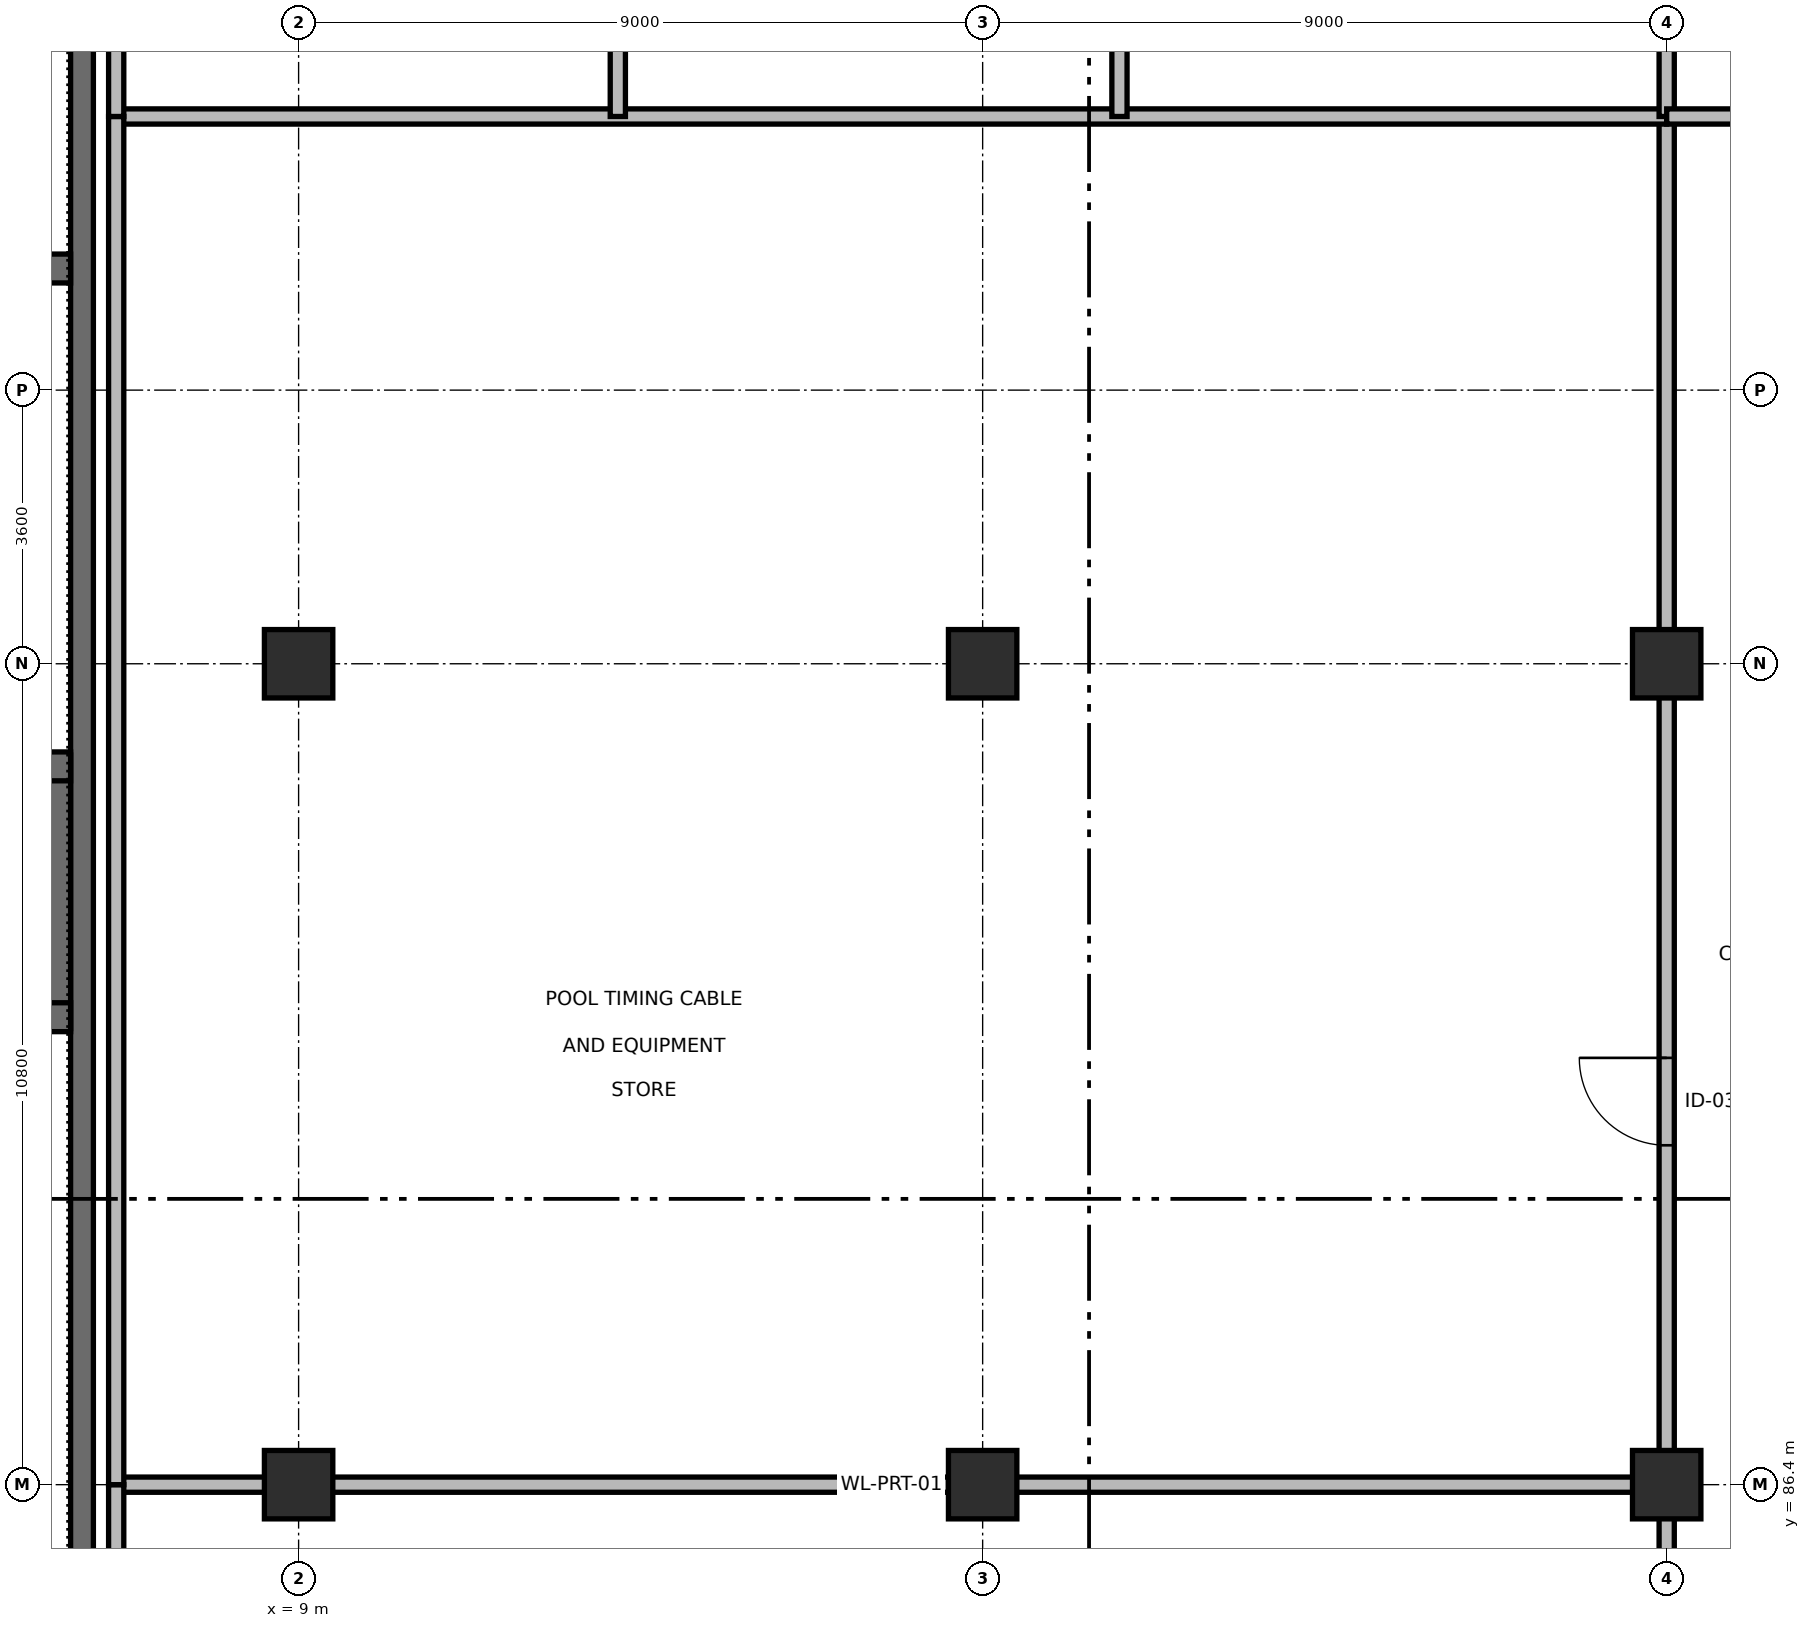
"""IFC4 building model, lengths in metres.
Left out: names, types, materials, properties, quantities, classifications, styles, units other than length and angle.
Written with IfcOpenShell. Run it as: python <this file> out.ifc"""

import sys

from ifc_helpers import new_model, si_unit, direction, frame, frame_2d, origin, origin_2d, place, context, subcontext, project, spatial, rectangle, extrude, element, fill, save


model = new_model("IFC4")
c1 = context("Model", 3, precision=1e-05, world=origin(), true_north=direction((0.0, 1.0)))
c2 = subcontext(c1, "Body", "Model", "MODEL_VIEW")
j1 = project(units=[si_unit("LENGTHUNIT", "METRE"), si_unit("PLANEANGLEUNIT", "RADIAN")], contexts=[c1])
p1 = place(None, origin())
s1 = spatial("IfcSite", under=j1, at=p1, CompositionType="ELEMENT")
p2 = place(p1, origin())
s2 = spatial("IfcBuilding", under=s1, at=p2, CompositionType="ELEMENT")
p3 = place(p2, frame((0.0, 0.0, -4.8)))
s3 = spatial("IfcBuildingStorey", under=s2, at=p3, CompositionType="ELEMENT", Elevation=-4.8)
for number, where, z_axis, x_axis in (
    (1, (9.0, 86.4, 0.0), (0.0, 0.0, 1.0), (1.0, 0.0, 0.0)),
    (2, (9.0, 97.2, 0.0), (0.0, 0.0, 1.0), (1.0, 0.0, 0.0)),
    (3, (18.0, 86.4, 0.0), (0.0, 0.0, 1.0), (1.0, 0.0, 0.0)),
    (4, (18.0, 97.2, 0.0), (0.0, 0.0, 1.0), (1.0, 0.0, 0.0)),
    (5, (27.0, 86.4, 0.0), (0.0, 0.0, 1.0), (1.0, 0.0, 0.0)),
    (6, (27.0, 97.2, 0.0), (0.0, 0.0, 1.0), (1.0, 0.0, 0.0)),
):
    element("IfcColumn", number, at=place(p3, frame(where, z_axis=z_axis, x_axis=x_axis)), inside=s3, PredefinedType="COLUMN", context=c2, shape_type="SweptSolid", body=[
        extrude(rectangle(XDim=0.9, YDim=0.9, at=origin_2d()), origin(), (0.0, 0.0, 1.0), 4.8),
    ])
p4 = place(p3, frame((6.15, 73.2, 0.0), z_axis=(0.0, 0.0, 1.0), x_axis=(0.0, 1.0, 0.0)))
e7 = element("IfcWall", 7, at=p4, inside=s3, PredefinedType="USERDEFINED", context=c2, shape_type="SweptSolid", body=[
    extrude(rectangle(XDim=41.7, YDim=0.3, at=frame_2d((20.85, 0.0))), origin(), (0.0, 0.0, 1.0), 4.45),
])
p5 = place(p3, frame((27.0, 68.4, 0.0), z_axis=(0.0, 0.0, 1.0), x_axis=(0.0, 1.0, 0.0)))
e8 = element("IfcWall", 8, at=p5, inside=s3, PredefinedType="PARTITIONING", context=c2, shape_type="SweptSolid", body=[
    extrude(rectangle(XDim=18.0, YDim=0.2, at=frame_2d((9.0, 0.0))), origin(), (0.0, 0.0, 1.0), 3.885),
])
p6 = place(p5, frame((4.515, 0.0, 0.0)))
e9 = element("IfcOpeningElement", 9, at=p6, cuts=e8, PredefinedType="OPENING", context=c2, shape_type="SweptSolid", body=[
    extrude(rectangle(XDim=1.05, YDim=2.15, at=frame_2d((0.525, 1.075))), frame((0.0, 0.11, 0.0), z_axis=(0.0, -1.0, 0.0), x_axis=(1.0, 0.0, 0.0)), (0.0, 0.0, 1.0), 0.22),
])
p7 = place(p3, frame((6.6, 86.4, 0.0), z_axis=(0.0, 0.0, 1.0), x_axis=(1.0, 0.0, 0.0)))
e10 = element("IfcWall", 10, at=p7, inside=s3, PredefinedType="PARTITIONING", context=c2, shape_type="SweptSolid", body=[
    extrude(rectangle(XDim=20.4, YDim=0.2, at=frame_2d((10.2, 0.0))), origin(), (0.0, 0.0, 1.0), 3.835),
])
p8 = place(p3, frame((6.6, 68.4, 0.0), z_axis=(0.0, 0.0, 1.0), x_axis=(0.0, 1.0, 0.0)))
e11 = element("IfcWall", 11, at=p8, inside=s3, PredefinedType="PARTITIONING", context=c2, shape_type="SweptSolid", body=[
    extrude(rectangle(XDim=18.0, YDim=0.2, at=frame_2d((9.0, 0.0))), origin(), (0.0, 0.0, 1.0), 3.835),
])
p9 = place(p3, frame((27.0, 86.4, 0.0), z_axis=(0.0, 0.0, 1.0), x_axis=(0.0, 1.0, 0.0)))
e12 = element("IfcWall", 12, at=p9, inside=s3, PredefinedType="PARTITIONING", context=c2, shape_type="SweptSolid", body=[
    extrude(rectangle(XDim=18.0, YDim=0.2, at=frame_2d((9.0, 0.0))), origin(), (0.0, 0.0, 1.0), 3.735),
])
p10 = place(p9, frame((4.465, 0.0, 0.0)))
e13 = element("IfcOpeningElement", 13, at=p10, cuts=e12, PredefinedType="OPENING", context=c2, shape_type="SweptSolid", body=[
    extrude(rectangle(XDim=1.15, YDim=2.2, at=frame_2d((0.575, 1.1))), frame((0.0, 0.11, 0.0), z_axis=(0.0, -1.0, 0.0), x_axis=(1.0, 0.0, 0.0)), (0.0, 0.0, 1.0), 0.22),
])
p11 = place(p3, frame((6.6, 104.4, 0.0), z_axis=(0.0, 0.0, 1.0), x_axis=(1.0, 0.0, 0.0)))
e14 = element("IfcWall", 14, at=p11, inside=s3, PredefinedType="PARTITIONING", context=c2, shape_type="SweptSolid", body=[
    extrude(rectangle(XDim=20.4, YDim=0.2, at=frame_2d((10.2, 0.0))), origin(), (0.0, 0.0, 1.0), 3.735),
])
p12 = place(p3, frame((6.6, 86.4, 0.0), z_axis=(0.0, 0.0, 1.0), x_axis=(0.0, 1.0, 0.0)))
e15 = element("IfcWall", 15, at=p12, inside=s3, PredefinedType="PARTITIONING", context=c2, shape_type="SweptSolid", body=[
    extrude(rectangle(XDim=18.0, YDim=0.2, at=frame_2d((9.0, 0.0))), origin(), (0.0, 0.0, 1.0), 4.485),
])
p13 = place(p3, frame((13.2, 104.4, 0.0), z_axis=(0.0, 0.0, 1.0), x_axis=(0.0, 1.0, 0.0)))
e16 = element("IfcWall", 16, at=p13, inside=s3, PredefinedType="PARTITIONING", context=c2, shape_type="SweptSolid", body=[
    extrude(rectangle(XDim=10.8, YDim=0.2, at=frame_2d((5.4, 0.0))), origin(), (0.0, 0.0, 1.0), 3.785),
])
p14 = place(p13, frame((6.171, 0.0, 0.0)))
e17 = element("IfcOpeningElement", 17, at=p14, cuts=e16, PredefinedType="OPENING", context=c2, shape_type="SweptSolid", body=[
    extrude(rectangle(XDim=1.05, YDim=2.15, at=frame_2d((0.525, 1.075))), frame((0.0, 0.11, 0.0), z_axis=(0.0, -1.0, 0.0), x_axis=(1.0, 0.0, 0.0)), (0.0, 0.0, 1.0), 0.22),
])
p15 = place(p3, frame((6.6, 104.4, 0.0), z_axis=(0.0, 0.0, 1.0), x_axis=(0.0, 1.0, 0.0)))
e18 = element("IfcWall", 18, at=p15, inside=s3, PredefinedType="PARTITIONING", context=c2, shape_type="SweptSolid", body=[
    extrude(rectangle(XDim=10.8, YDim=0.2, at=frame_2d((5.4, 0.0))), origin(), (0.0, 0.0, 1.0), 3.785),
])
p16 = place(p3, frame((19.8, 104.4, 0.0), z_axis=(0.0, 0.0, 1.0), x_axis=(0.0, 1.0, 0.0)))
e19 = element("IfcWall", 19, at=p16, inside=s3, PredefinedType="PARTITIONING", context=c2, shape_type="SweptSolid", body=[
    extrude(rectangle(XDim=10.8, YDim=0.2, at=frame_2d((5.4, 0.0))), origin(), (0.0, 0.0, 1.0), 3.785),
])
p17 = place(p16, frame((6.121, 0.0, 0.0)))
e20 = element("IfcOpeningElement", 20, at=p17, cuts=e19, PredefinedType="OPENING", context=c2, shape_type="SweptSolid", body=[
    extrude(rectangle(XDim=1.15, YDim=2.2, at=frame_2d((0.575, 1.1))), frame((0.0, 0.11, 0.0), z_axis=(0.0, -1.0, 0.0), x_axis=(1.0, 0.0, 0.0)), (0.0, 0.0, 1.0), 0.22),
])
p18 = place(p3, frame((27.0, 104.4, 0.0), z_axis=(0.0, 0.0, 1.0), x_axis=(0.0, 1.0, 0.0)))
e21 = element("IfcWall", 21, at=p18, inside=s3, PredefinedType="PARTITIONING", context=c2, shape_type="SweptSolid", body=[
    extrude(rectangle(XDim=10.8, YDim=0.2, at=frame_2d((5.4, 0.0))), origin(), (0.0, 0.0, 1.0), 3.735),
])
p19 = place(p18, frame((6.171, 0.0, 0.0)))
e22 = element("IfcOpeningElement", 22, at=p19, cuts=e21, PredefinedType="OPENING", context=c2, shape_type="SweptSolid", body=[
    extrude(rectangle(XDim=1.05, YDim=2.15, at=frame_2d((0.525, 1.075))), frame((0.0, 0.11, 0.0), z_axis=(0.0, -1.0, 0.0), x_axis=(1.0, 0.0, 0.0)), (0.0, 0.0, 1.0), 0.22),
])
p20 = place(p3, frame((27.0, 104.4, 0.0), z_axis=(0.0, 0.0, 1.0), x_axis=(1.0, 0.0, 0.0)))
e23 = element("IfcWall", 23, at=p20, inside=s3, PredefinedType="PARTITIONING", context=c2, shape_type="SweptSolid", body=[
    extrude(rectangle(XDim=8.6, YDim=0.2, at=frame_2d((4.3, 0.0))), origin(), (0.0, 0.0, 1.0), 3.735),
])
p21 = place(p20, frame((3.775, 0.0, 0.0)))
e24 = element("IfcOpeningElement", 24, at=p21, cuts=e23, PredefinedType="OPENING", context=c2, shape_type="SweptSolid", body=[
    extrude(rectangle(XDim=1.05, YDim=2.15, at=frame_2d((0.525, 1.075))), frame((0.0, 0.11, 0.0), z_axis=(0.0, -1.0, 0.0), x_axis=(1.0, 0.0, 0.0)), (0.0, 0.0, 1.0), 0.22),
])
p22 = place(p3, frame((1.2, 102.4, 0.0), z_axis=(0.0, 0.0, 1.0), x_axis=(1.0, 0.0, 0.0)))
e25 = element("IfcWall", 25, at=p22, inside=s3, PredefinedType="SHEAR", context=c2, shape_type="SweptSolid", body=[
    extrude(rectangle(XDim=4.8, YDim=0.38, at=frame_2d((2.4, 0.0))), origin(), (0.0, 0.0, 1.0), 2.96),
])
p23 = place(p3, frame((5.81, 92.4, 0.0), z_axis=(0.0, 0.0, 1.0), x_axis=(0.0, 1.0, 0.0)))
e26 = element("IfcWall", 26, at=p23, inside=s3, PredefinedType="SHEAR", context=c2, shape_type="SweptSolid", body=[
    extrude(rectangle(XDim=3.6, YDim=0.38, at=frame_2d((1.8, 0.0))), origin(), (0.0, 0.0, 1.0), 2.15),
])
for number, where, z_axis, x_axis in (
    (27, (1.2, 92.55, 0.0), (0.0, 0.0, 1.0), (1.0, 0.0, 0.0)),
    (28, (1.2, 95.85, 0.0), (0.0, 0.0, 1.0), (1.0, 0.0, 0.0)),
):
    element("IfcWall", number, at=place(p3, frame(where, z_axis=z_axis, x_axis=x_axis)), inside=s3, PredefinedType="SHEAR", context=c2, shape_type="SweptSolid", body=[
        extrude(rectangle(XDim=4.8, YDim=0.38, at=frame_2d((2.4, 0.0))), origin(), (0.0, 0.0, 1.0), 2.15),
    ])
p24 = place(p10, origin())
e29 = element("IfcDoor", 29, at=p24, inside=s3, OperationType="SINGLE_SWING_RIGHT", PredefinedType="DOOR", context=c2, shape_type="SweptSolid", body=[
    extrude(rectangle(XDim=1.15, YDim=2.2, at=frame_2d((0.575, 1.1))), frame((0.0, 0.025, 0.0), z_axis=(0.0, -1.0, 0.0), x_axis=(1.0, 0.0, 0.0)), (0.0, 0.0, 1.0), 0.05),
])
fill(e13, e29)
save(model, sys.argv[1])
